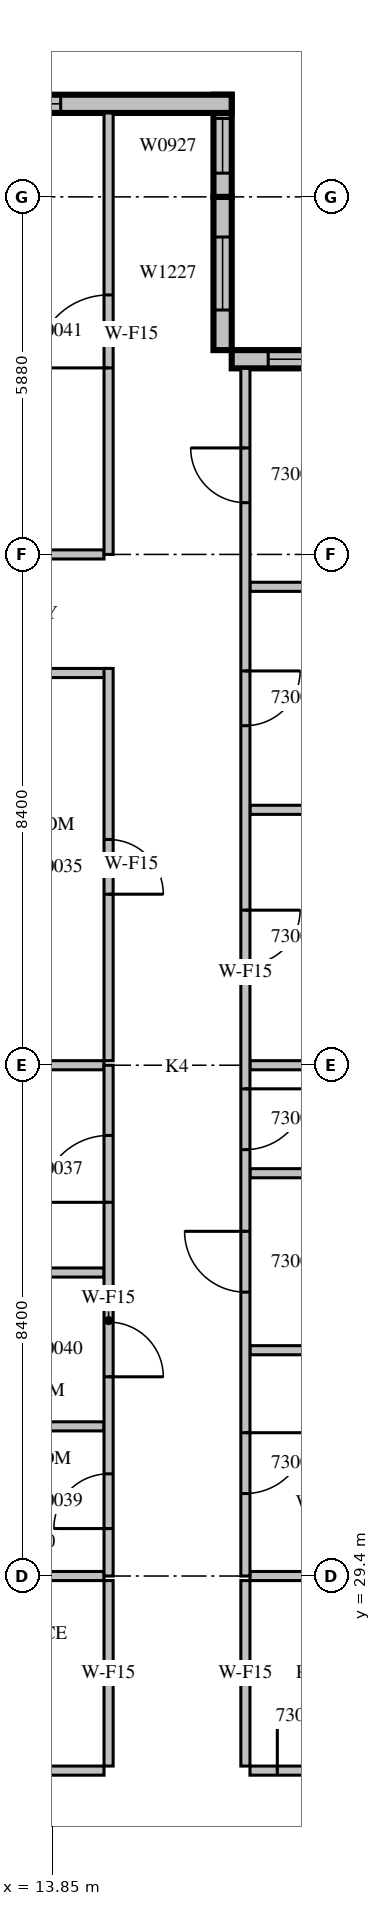
"""IFC4 building model, lengths in metres.
Left out: names, types, materials, properties, quantities, classifications, styles, units other than length and angle.
Written with IfcOpenShell. Run it as: python <this file> out.ifc"""

import sys

from ifc_helpers import new_model, si_unit, direction, frame, frame_2d, origin, place, context, subcontext, project, spatial, rectangle, extrude, source, transform, mapped, element, fill, save


model = new_model("IFC4")
c1 = context("Model", 3, precision=1e-05, world=origin(), true_north=direction((0.0, 1.0)))
c2 = subcontext(c1, "Body", "Model", "MODEL_VIEW")
j1 = project(units=[si_unit("LENGTHUNIT", "METRE"), si_unit("PLANEANGLEUNIT", "RADIAN")], contexts=[c1])
p1 = place(None, origin())
s1 = spatial("IfcSite", under=j1, at=p1, CompositionType="ELEMENT")
p2 = place(p1, origin())
s2 = spatial("IfcBuilding", under=s1, at=p2, CompositionType="ELEMENT")
p3 = place(p2, frame((0.0, 0.0, 137.1)))
s3 = spatial("IfcBuildingStorey", under=s2, at=p3, CompositionType="ELEMENT", Elevation=137.1)
m1 = source(origin(), c2, "Body", "SweptSolid", [
    extrude(rectangle(XDim=4.2, YDim=0.3, at=frame_2d((2.1, 0.0))), origin(), (0.0, 0.0, 1.0), 3.8),
])
p4 = place(p3, frame((21.0, 49.41, 0.0), z_axis=(0.0, 0.0, 1.0), x_axis=(-1.0, 0.0, 0.0)))
e1 = element("IfcWall", 1, at=p4, inside=s3, PredefinedType="STANDARD", context=c2, shape_type="MappedRepresentation", body=[
    mapped(m1, transform((0.0, 0.0, 0.0), scale=1.0)),
])
m2 = source(origin(), c2, "Body", "SweptSolid", [
    extrude(rectangle(XDim=3.0, YDim=2.7, at=frame_2d((1.5, 1.35))), frame((0.0, 0.16, 0.0), z_axis=(0.0, -1.0, 0.0), x_axis=(1.0, 0.0, 0.0)), (0.0, 0.0, 1.0), 0.32),
])
p5 = place(p4, frame((0.6, 0.0, 0.6)))
e2 = element("IfcOpeningElement", 2, at=p5, cuts=e1, PredefinedType="OPENING", context=c2, shape_type="MappedRepresentation", body=[
    mapped(m2, transform((0.0, 0.0, 0.0), scale=1.0)),
])
m3 = source(origin(), c2, "Body", "SweptSolid", [
    extrude(rectangle(XDim=2.52, YDim=0.3, at=frame_2d((1.26, 0.0))), origin(), (0.0, 0.0, 1.0), 3.8),
])
p6 = place(p3, frame((16.65, 49.56, 0.0), z_axis=(0.0, 0.0, 1.0), x_axis=(0.0, 1.0, 0.0)))
e3 = element("IfcWall", 3, at=p6, inside=s3, PredefinedType="STANDARD", context=c2, shape_type="MappedRepresentation", body=[
    mapped(m3, transform((0.0, 0.0, 0.0), scale=1.0)),
])
m4 = source(origin(), c2, "Body", "SweptSolid", [
    extrude(rectangle(XDim=1.2, YDim=2.7, at=frame_2d((0.6, 1.35))), frame((0.0, 0.16, 0.0), z_axis=(0.0, -1.0, 0.0), x_axis=(1.0, 0.0, 0.0)), (0.0, 0.0, 1.0), 0.32),
])
p7 = place(p6, frame((0.66, 0.0, 0.6)))
e4 = element("IfcOpeningElement", 4, at=p7, cuts=e3, PredefinedType="OPENING", context=c2, shape_type="MappedRepresentation", body=[
    mapped(m4, transform((0.0, 0.0, 0.0), scale=1.0)),
])
m5 = source(origin(), c2, "Body", "SweptSolid", [
    extrude(rectangle(XDim=1.68, YDim=0.3, at=frame_2d((0.84, 0.0))), origin(), (0.0, 0.0, 1.0), 3.8),
])
p8 = place(p3, frame((16.65, 52.08, 0.0), z_axis=(0.0, 0.0, 1.0), x_axis=(0.0, 1.0, 0.0)))
e5 = element("IfcWall", 5, at=p8, inside=s3, PredefinedType="STANDARD", context=c2, shape_type="MappedRepresentation", body=[
    mapped(m5, transform((0.0, 0.0, 0.0), scale=1.0)),
])
m6 = source(origin(), c2, "Body", "SweptSolid", [
    extrude(rectangle(XDim=0.9, YDim=2.7, at=frame_2d((0.45, 1.35))), frame((0.0, 0.16, 0.0), z_axis=(0.0, -1.0, 0.0), x_axis=(1.0, 0.0, 0.0)), (0.0, 0.0, 1.0), 0.32),
])
p9 = place(p8, frame((0.39, 0.0, 0.6)))
e6 = element("IfcOpeningElement", 6, at=p9, cuts=e5, PredefinedType="OPENING", context=c2, shape_type="MappedRepresentation", body=[
    mapped(m6, transform((0.0, 0.0, 0.0), scale=1.0)),
])
m7 = source(origin(), c2, "Body", "SweptSolid", [
    extrude(rectangle(XDim=10.5, YDim=0.3, at=frame_2d((5.25, 0.0))), origin(), (0.0, 0.0, 1.0), 3.8),
])
p10 = place(p3, frame((16.8, 53.61, 0.0), z_axis=(0.0, 0.0, 1.0), x_axis=(-1.0, 0.0, 0.0)))
e7 = element("IfcWall", 7, at=p10, inside=s3, PredefinedType="STANDARD", context=c2, shape_type="MappedRepresentation", body=[
    mapped(m7, transform((0.0, 0.0, 0.0), scale=1.0)),
])
m8 = source(origin(), c2, "Body", "SweptSolid", [
    extrude(rectangle(XDim=1.8, YDim=2.7, at=frame_2d((0.9, 1.35))), frame((0.0, 0.16, 0.0), z_axis=(0.0, -1.0, 0.0), x_axis=(1.0, 0.0, 0.0)), (0.0, 0.0, 1.0), 0.32),
])
p11 = place(p10, frame((8.025, 0.0, 0.6)))
e8 = element("IfcOpeningElement", 8, at=p11, cuts=e7, PredefinedType="OPENING", context=c2, shape_type="MappedRepresentation", body=[
    mapped(m8, transform((0.0, 0.0, 0.0), scale=1.0)),
])
m9 = source(origin(), c2, "Body", "SweptSolid", [
    extrude(rectangle(XDim=2.4, YDim=2.7, at=frame_2d((1.2, 1.35))), frame((0.0, 0.16, 0.0), z_axis=(0.0, -1.0, 0.0), x_axis=(1.0, 0.0, 0.0)), (0.0, 0.0, 1.0), 0.32),
])
p12 = place(p10, frame((2.812, 0.0, 0.6)))
e9 = element("IfcOpeningElement", 9, at=p12, cuts=e7, PredefinedType="OPENING", context=c2, shape_type="MappedRepresentation", body=[
    mapped(m9, transform((0.0, 0.0, 0.0), scale=1.0)),
])
m10 = source(origin(), c2, "Body", "SweptSolid", [
    extrude(rectangle(XDim=8.195, YDim=0.15, at=frame_2d((4.098, 0.0))), origin(), (0.0, 0.0, 1.0), 3.8),
])
p13 = place(p3, frame((6.505, 26.2, 0.0), z_axis=(0.0, 0.0, 1.0), x_axis=(1.0, 0.0, 0.0)))
e10 = element("IfcWall", 10, at=p13, inside=s3, PredefinedType="PARTITIONING", context=c2, shape_type="MappedRepresentation", body=[
    mapped(m10, transform((0.0, 0.0, 0.0), scale=1.0)),
])
m11 = source(origin(), c2, "Body", "SweptSolid", [
    extrude(rectangle(XDim=0.9, YDim=2.1, at=frame_2d((0.45, 1.05))), frame((0.0, 0.085, 0.0), z_axis=(0.0, -1.0, 0.0), x_axis=(1.0, 0.0, 0.0)), (0.0, 0.0, 1.0), 0.17),
])
p14 = place(p13, frame((0.695, 0.0, 0.0)))
e11 = element("IfcOpeningElement", 11, at=p14, cuts=e10, PredefinedType="OPENING", context=c2, shape_type="MappedRepresentation", body=[
    mapped(m11, transform((0.0, 0.0, 0.0), scale=1.0)),
])
p15 = place(p13, frame((5.62, 0.0, 0.0)))
e12 = element("IfcOpeningElement", 12, at=p15, cuts=e10, PredefinedType="OPENING", context=c2, shape_type="MappedRepresentation", body=[
    mapped(m11, transform((0.0, 0.0, 0.0), scale=1.0)),
])
m12 = source(origin(), c2, "Body", "SweptSolid", [
    extrude(rectangle(XDim=3.6, YDim=0.15, at=frame_2d((1.8, 0.0))), origin(), (0.0, 0.0, 1.0), 3.8),
])
p16 = place(p3, frame((17.1, 26.2, 0.0), z_axis=(0.0, 0.0, 1.0), x_axis=(1.0, 0.0, 0.0)))
e13 = element("IfcWall", 13, at=p16, inside=s3, PredefinedType="PARTITIONING", context=c2, shape_type="MappedRepresentation", body=[
    mapped(m12, transform((0.0, 0.0, 0.0), scale=1.0)),
])
p17 = place(p16, frame((0.45, 0.0, 0.0)))
e14 = element("IfcOpeningElement", 14, at=p17, cuts=e13, PredefinedType="OPENING", context=c2, shape_type="MappedRepresentation", body=[
    mapped(m11, transform((0.0, 0.0, 0.0), scale=1.0)),
])
m13 = source(origin(), c2, "Body", "SweptSolid", [
    extrude(rectangle(XDim=3.05, YDim=0.15, at=frame_2d((1.525, 0.0))), origin(), (0.0, 0.0, 1.0), 3.8),
])
for number, where, z_axis, x_axis in (
    (15, (14.775, 26.275, 0.0), (0.0, 0.0, 1.0), (0.0, 1.0, 0.0)),
    (16, (17.025, 29.325, 0.0), (0.0, 0.0, 1.0), (0.0, -1.0, 0.0)),
):
    element("IfcWall", number, at=place(p3, frame(where, z_axis=z_axis, x_axis=x_axis)), inside=s3, PredefinedType="PARTITIONING", context=c2, shape_type="MappedRepresentation", body=[
        mapped(m13, transform((0.0, 0.0, 0.0), scale=1.0)),
    ])
m14 = source(origin(), c2, "Body", "SweptSolid", [
    extrude(rectangle(XDim=3.676, YDim=0.15, at=frame_2d((1.838, 0.0))), origin(), (0.0, 0.0, 1.0), 3.8),
])
p18 = place(p3, frame((14.7, 29.4, 0.0), z_axis=(0.0, 0.0, 1.0), x_axis=(-1.0, 0.0, 0.0)))
e17 = element("IfcWall", 17, at=p18, inside=s3, PredefinedType="PARTITIONING", context=c2, shape_type="MappedRepresentation", body=[
    mapped(m14, transform((0.0, 0.0, 0.0), scale=1.0)),
])
m15 = source(origin(), c2, "Body", "SweptSolid", [
    extrude(rectangle(XDim=2.851, YDim=0.15, at=frame_2d((1.425, 0.0))), origin(), (0.0, 0.0, 1.0), 3.8),
])
p19 = place(p3, frame((19.951, 29.4, 0.0), z_axis=(0.0, 0.0, 1.0), x_axis=(-1.0, 0.0, 0.0)))
e18 = element("IfcWall", 18, at=p19, inside=s3, PredefinedType="PARTITIONING", context=c2, shape_type="MappedRepresentation", body=[
    mapped(m15, transform((0.0, 0.0, 0.0), scale=1.0)),
])
m16 = source(origin(), c2, "Body", "SweptSolid", [
    extrude(rectangle(XDim=3.675, YDim=0.15, at=frame_2d((1.837, 0.0))), origin(), (0.0, 0.0, 1.0), 3.8),
])
p20 = place(p3, frame((14.775, 44.25, 0.0), z_axis=(0.0, 0.0, 1.0), x_axis=(-1.0, 0.0, 0.0)))
e19 = element("IfcWall", 19, at=p20, inside=s3, PredefinedType="PARTITIONING", context=c2, shape_type="MappedRepresentation", body=[
    mapped(m16, transform((0.0, 0.0, 0.0), scale=1.0)),
])
m17 = source(origin(), c2, "Body", "SweptSolid", [
    extrude(rectangle(XDim=6.45, YDim=0.15, at=frame_2d((3.225, 0.0))), origin(), (0.0, 0.0, 1.0), 3.8),
])
p21 = place(p3, frame((14.775, 37.875, 0.0), z_axis=(0.0, 0.0, 1.0), x_axis=(0.0, 1.0, 0.0)))
e20 = element("IfcWall", 20, at=p21, inside=s3, PredefinedType="PARTITIONING", context=c2, shape_type="MappedRepresentation", body=[
    mapped(m17, transform((0.0, 0.0, 0.0), scale=1.0)),
])
p22 = place(p21, frame((2.737, 0.0, 0.0)))
e21 = element("IfcOpeningElement", 21, at=p22, cuts=e20, PredefinedType="OPENING", context=c2, shape_type="MappedRepresentation", body=[
    mapped(m11, transform((0.0, 0.0, 0.0), scale=1.0)),
])
m18 = source(origin(), c2, "Body", "SweptSolid", [
    extrude(rectangle(XDim=3.525, YDim=0.15, at=frame_2d((1.762, 0.0))), origin(), (0.0, 0.0, 1.0), 3.8),
])
for number, where, z_axis, x_axis in (
    (22, (14.7, 31.861, 0.0), (0.0, 0.0, 1.0), (-1.0, 0.0, 0.0)),
    (23, (14.7, 34.391, 0.0), (0.0, 0.0, 1.0), (-1.0, 0.0, 0.0)),
    (24, (14.7, 37.8, 0.0), (0.0, 0.0, 1.0), (-1.0, 0.0, 0.0)),
    (25, (14.7, 46.2, 0.0), (0.0, 0.0, 1.0), (-1.0, 0.0, 0.0)),
):
    element("IfcWall", number, at=place(p3, frame(where, z_axis=z_axis, x_axis=x_axis)), inside=s3, PredefinedType="PARTITIONING", context=c2, shape_type="MappedRepresentation", body=[
        mapped(m18, transform((0.0, 0.0, 0.0), scale=1.0)),
    ])
for number, where, z_axis, x_axis in (
    (26, (17.1, 33.113, 0.0), (0.0, 0.0, 1.0), (1.0, 0.0, 0.0)),
    (27, (17.1, 36.024, 0.0), (0.0, 0.0, 1.0), (1.0, 0.0, 0.0)),
    (28, (17.1, 45.667, 0.0), (0.0, 0.0, 1.0), (1.0, 0.0, 0.0)),
):
    element("IfcWall", number, at=place(p3, frame(where, z_axis=z_axis, x_axis=x_axis)), inside=s3, PredefinedType="PARTITIONING", context=c2, shape_type="MappedRepresentation", body=[
        mapped(m12, transform((0.0, 0.0, 0.0), scale=1.0)),
    ])
p23 = place(p3, frame((19.951, 37.8, 0.0), z_axis=(0.0, 0.0, 1.0), x_axis=(-1.0, 0.0, 0.0)))
e29 = element("IfcWall", 29, at=p23, inside=s3, PredefinedType="PARTITIONING", context=c2, shape_type="MappedRepresentation", body=[
    mapped(m15, transform((0.0, 0.0, 0.0), scale=1.0)),
])
p24 = place(p3, frame((20.7, 42.0, 0.0), z_axis=(0.0, 0.0, 1.0), x_axis=(-1.0, 0.0, 0.0)))
e30 = element("IfcWall", 30, at=p24, inside=s3, PredefinedType="PARTITIONING", context=c2, shape_type="MappedRepresentation", body=[
    mapped(m12, transform((0.0, 0.0, 0.0), scale=1.0)),
])
m19 = source(origin(), c2, "Body", "SweptSolid", [
    extrude(rectangle(XDim=8.4, YDim=0.15, at=frame_2d((4.2, 0.0))), origin(), (0.0, 0.0, 1.0), 3.8),
])
p25 = place(p3, frame((14.775, 29.4, 0.0), z_axis=(0.0, 0.0, 1.0), x_axis=(0.0, 1.0, 0.0)))
e31 = element("IfcWall", 31, at=p25, inside=s3, PredefinedType="PARTITIONING", context=c2, shape_type="MappedRepresentation", body=[
    mapped(m19, transform((0.0, 0.0, 0.0), scale=1.0)),
])
m20 = source(origin(), c2, "Body", "SweptSolid", [
    extrude(rectangle(XDim=1.1, YDim=2.1, at=frame_2d((0.55, 1.05))), frame((0.0, 0.085, 0.0), z_axis=(0.0, -1.0, 0.0), x_axis=(1.0, 0.0, 0.0)), (0.0, 0.0, 1.0), 0.17),
])
p26 = place(p25, frame((6.146, 0.0, 0.0)))
e32 = element("IfcOpeningElement", 32, at=p26, cuts=e31, PredefinedType="OPENING", context=c2, shape_type="MappedRepresentation", body=[
    mapped(m20, transform((0.0, 0.0, 0.0), scale=1.0)),
])
p27 = place(p25, frame((0.781, 0.0, 0.0)))
e33 = element("IfcOpeningElement", 33, at=p27, cuts=e31, PredefinedType="OPENING", context=c2, shape_type="MappedRepresentation", body=[
    mapped(m11, transform((0.0, 0.0, 0.0), scale=1.0)),
])
p28 = place(p25, frame((3.276, 0.0, 0.0)))
e34 = element("IfcOpeningElement", 34, at=p28, cuts=e31, PredefinedType="OPENING", context=c2, shape_type="MappedRepresentation", body=[
    mapped(m11, transform((0.0, 0.0, 0.0), scale=1.0)),
])
m21 = source(origin(), c2, "Body", "SweptSolid", [
    extrude(rectangle(XDim=7.26, YDim=0.15, at=frame_2d((3.63, 0.0))), origin(), (0.0, 0.0, 1.0), 3.8),
])
p29 = place(p3, frame((14.775, 46.2, 0.0), z_axis=(0.0, 0.0, 1.0), x_axis=(0.0, 1.0, 0.0)))
e35 = element("IfcWall", 35, at=p29, inside=s3, PredefinedType="PARTITIONING", context=c2, shape_type="MappedRepresentation", body=[
    mapped(m21, transform((0.0, 0.0, 0.0), scale=1.0)),
])
m22 = source(origin(), c2, "Body", "SweptSolid", [
    extrude(rectangle(XDim=1.2, YDim=2.1, at=frame_2d((0.6, 1.05))), frame((0.0, 0.085, 0.0), z_axis=(0.0, -1.0, 0.0), x_axis=(1.0, 0.0, 0.0)), (0.0, 0.0, 1.0), 0.17),
])
p30 = place(p29, frame((3.067, 0.0, 0.0)))
e36 = element("IfcOpeningElement", 36, at=p30, cuts=e35, PredefinedType="OPENING", context=c2, shape_type="MappedRepresentation", body=[
    mapped(m22, transform((0.0, 0.0, 0.0), scale=1.0)),
])
m23 = source(origin(), c2, "Body", "SweptSolid", [
    extrude(rectangle(XDim=19.86, YDim=0.15, at=frame_2d((9.93, 0.0))), origin(), (0.0, 0.0, 1.0), 3.8),
])
p31 = place(p3, frame((17.025, 49.26, 0.0), z_axis=(0.0, 0.0, 1.0), x_axis=(0.0, -1.0, 0.0)))
e37 = element("IfcWall", 37, at=p31, inside=s3, PredefinedType="PARTITIONING", context=c2, shape_type="MappedRepresentation", body=[
    mapped(m23, transform((0.0, 0.0, 0.0), scale=1.0)),
])
m24 = source(origin(), c2, "Body", "SweptSolid", [
    extrude(rectangle(XDim=1.0, YDim=2.1, at=frame_2d((0.5, 1.05))), frame((0.0, 0.085, 0.0), z_axis=(0.0, -1.0, 0.0), x_axis=(1.0, 0.0, 0.0)), (0.0, 0.0, 1.0), 0.17),
])
p32 = place(p31, frame((17.503, 0.0, 0.0)))
e38 = element("IfcOpeningElement", 38, at=p32, cuts=e37, PredefinedType="OPENING", context=c2, shape_type="MappedRepresentation", body=[
    mapped(m24, transform((0.0, 0.0, 0.0), scale=1.0)),
])
p33 = place(p31, frame((14.191, 0.0, 0.0)))
e39 = element("IfcOpeningElement", 39, at=p33, cuts=e37, PredefinedType="OPENING", context=c2, shape_type="MappedRepresentation", body=[
    mapped(m24, transform((0.0, 0.0, 0.0), scale=1.0)),
])
p34 = place(p31, frame((11.848, 0.0, 0.0)))
e40 = element("IfcOpeningElement", 40, at=p34, cuts=e37, PredefinedType="OPENING", context=c2, shape_type="MappedRepresentation", body=[
    mapped(m24, transform((0.0, 0.0, 0.0), scale=1.0)),
])
p35 = place(p31, frame((8.91, 0.0, 0.0)))
e41 = element("IfcOpeningElement", 41, at=p35, cuts=e37, PredefinedType="OPENING", context=c2, shape_type="MappedRepresentation", body=[
    mapped(m11, transform((0.0, 0.0, 0.0), scale=1.0)),
])
p36 = place(p31, frame((4.976, 0.0, 0.0)))
e42 = element("IfcOpeningElement", 42, at=p36, cuts=e37, PredefinedType="OPENING", context=c2, shape_type="MappedRepresentation", body=[
    mapped(m11, transform((0.0, 0.0, 0.0), scale=1.0)),
])
p37 = place(p31, frame((1.309, 0.0, 0.0)))
e43 = element("IfcOpeningElement", 43, at=p37, cuts=e37, PredefinedType="OPENING", context=c2, shape_type="MappedRepresentation", body=[
    mapped(m11, transform((0.0, 0.0, 0.0), scale=1.0)),
])
m25 = source(origin(), c2, "Body", "SweptSolid", [
    extrude(rectangle(XDim=3.0, YDim=2.7, at=frame_2d((1.5, 1.35))), frame((0.0, 0.03, 0.0), z_axis=(0.0, -1.0, 0.0), x_axis=(1.0, 0.0, 0.0)), (0.0, 0.0, 1.0), 0.06),
])
p38 = place(p5, origin())
e44 = element("IfcWindow", 44, at=p38, inside=s3, PartitioningType="SINGLE_PANEL", PredefinedType="WINDOW", context=c2, shape_type="MappedRepresentation", body=[
    mapped(m25, transform((0.0, 0.0, 0.0), scale=1.0)),
])
fill(e2, e44)
m26 = source(origin(), c2, "Body", "SweptSolid", [
    extrude(rectangle(XDim=1.2, YDim=2.7, at=frame_2d((0.6, 1.35))), frame((0.0, 0.03, 0.0), z_axis=(0.0, -1.0, 0.0), x_axis=(1.0, 0.0, 0.0)), (0.0, 0.0, 1.0), 0.06),
])
p39 = place(p7, origin())
e45 = element("IfcWindow", 45, at=p39, inside=s3, PartitioningType="SINGLE_PANEL", PredefinedType="WINDOW", context=c2, shape_type="MappedRepresentation", body=[
    mapped(m26, transform((0.0, 0.0, 0.0), scale=1.0)),
])
fill(e4, e45)
m27 = source(origin(), c2, "Body", "SweptSolid", [
    extrude(rectangle(XDim=0.9, YDim=2.7, at=frame_2d((0.45, 1.35))), frame((0.0, 0.03, 0.0), z_axis=(0.0, -1.0, 0.0), x_axis=(1.0, 0.0, 0.0)), (0.0, 0.0, 1.0), 0.06),
])
p40 = place(p9, origin())
e46 = element("IfcWindow", 46, at=p40, inside=s3, PartitioningType="SINGLE_PANEL", PredefinedType="WINDOW", context=c2, shape_type="MappedRepresentation", body=[
    mapped(m27, transform((0.0, 0.0, 0.0), scale=1.0)),
])
fill(e6, e46)
m28 = source(origin(), c2, "Body", "SweptSolid", [
    extrude(rectangle(XDim=2.4, YDim=2.7, at=frame_2d((1.2, 1.35))), frame((0.0, 0.03, 0.0), z_axis=(0.0, -1.0, 0.0), x_axis=(1.0, 0.0, 0.0)), (0.0, 0.0, 1.0), 0.06),
])
p41 = place(p12, origin())
e47 = element("IfcWindow", 47, at=p41, inside=s3, PartitioningType="SINGLE_PANEL", PredefinedType="WINDOW", context=c2, shape_type="MappedRepresentation", body=[
    mapped(m28, transform((0.0, 0.0, 0.0), scale=1.0)),
])
fill(e9, e47)
m29 = source(origin(), c2, "Body", "SweptSolid", [
    extrude(rectangle(XDim=0.9, YDim=2.1, at=frame_2d((0.45, 1.05))), frame((0.0, 0.025, 0.0), z_axis=(0.0, -1.0, 0.0), x_axis=(1.0, 0.0, 0.0)), (0.0, 0.0, 1.0), 0.05),
])
p42 = place(p17, origin())
e48 = element("IfcDoor", 48, at=p42, inside=s3, OperationType="SINGLE_SWING_LEFT", PredefinedType="DOOR", context=c2, shape_type="MappedRepresentation", body=[
    mapped(m29, transform((0.0, 0.0, 0.0), scale=1.0)),
])
fill(e14, e48)
p43 = place(p22, origin())
e49 = element("IfcDoor", 49, at=p43, inside=s3, OperationType="SINGLE_SWING_RIGHT", PredefinedType="DOOR", context=c2, shape_type="MappedRepresentation", body=[
    mapped(m29, transform((0.0, 0.0, 0.0), scale=1.0)),
])
fill(e21, e49)
m30 = source(origin(), c2, "Body", "SweptSolid", [
    extrude(rectangle(XDim=1.1, YDim=2.1, at=frame_2d((0.55, 1.05))), frame((0.0, 0.025, 0.0), z_axis=(0.0, -1.0, 0.0), x_axis=(1.0, 0.0, 0.0)), (0.0, 0.0, 1.0), 0.05),
])
p44 = place(p26, origin())
e50 = element("IfcDoor", 50, at=p44, inside=s3, OperationType="SINGLE_SWING_LEFT", PredefinedType="DOOR", context=c2, shape_type="MappedRepresentation", body=[
    mapped(m30, transform((0.0, 0.0, 0.0), scale=1.0)),
])
fill(e32, e50)
p45 = place(p27, origin())
e51 = element("IfcDoor", 51, at=p45, inside=s3, OperationType="SINGLE_SWING_LEFT", PredefinedType="DOOR", context=c2, shape_type="MappedRepresentation", body=[
    mapped(m29, transform((0.0, 0.0, 0.0), scale=1.0)),
])
fill(e33, e51)
p46 = place(p28, origin())
e52 = element("IfcDoor", 52, at=p46, inside=s3, OperationType="SINGLE_SWING_RIGHT", PredefinedType="DOOR", context=c2, shape_type="MappedRepresentation", body=[
    mapped(m29, transform((0.0, 0.0, 0.0), scale=1.0)),
])
fill(e34, e52)
m31 = source(origin(), c2, "Body", "SweptSolid", [
    extrude(rectangle(XDim=1.2, YDim=2.1, at=frame_2d((0.6, 1.05))), frame((0.0, 0.025, 0.0), z_axis=(0.0, -1.0, 0.0), x_axis=(1.0, 0.0, 0.0)), (0.0, 0.0, 1.0), 0.05),
])
p47 = place(p30, origin())
e53 = element("IfcDoor", 53, at=p47, inside=s3, OperationType="SINGLE_SWING_LEFT", PredefinedType="DOOR", context=c2, shape_type="MappedRepresentation", body=[
    mapped(m31, transform((0.0, 0.0, 0.0), scale=1.0)),
])
fill(e36, e53)
m32 = source(origin(), c2, "Body", "SweptSolid", [
    extrude(rectangle(XDim=1.0, YDim=2.1, at=frame_2d((0.5, 1.05))), frame((0.0, 0.025, 0.0), z_axis=(0.0, -1.0, 0.0), x_axis=(1.0, 0.0, 0.0)), (0.0, 0.0, 1.0), 0.05),
])
p48 = place(p32, origin())
e54 = element("IfcDoor", 54, at=p48, inside=s3, OperationType="SINGLE_SWING_LEFT", PredefinedType="DOOR", context=c2, shape_type="MappedRepresentation", body=[
    mapped(m32, transform((0.0, 0.0, 0.0), scale=1.0)),
])
fill(e38, e54)
p49 = place(p33, origin())
e55 = element("IfcDoor", 55, at=p49, inside=s3, OperationType="SINGLE_SWING_RIGHT", PredefinedType="DOOR", context=c2, shape_type="MappedRepresentation", body=[
    mapped(m32, transform((0.0, 0.0, 0.0), scale=1.0)),
])
fill(e39, e55)
p50 = place(p34, origin())
e56 = element("IfcDoor", 56, at=p50, inside=s3, OperationType="SINGLE_SWING_LEFT", PredefinedType="DOOR", context=c2, shape_type="MappedRepresentation", body=[
    mapped(m32, transform((0.0, 0.0, 0.0), scale=1.0)),
])
fill(e40, e56)
p51 = place(p35, origin())
e57 = element("IfcDoor", 57, at=p51, inside=s3, OperationType="SINGLE_SWING_LEFT", PredefinedType="DOOR", context=c2, shape_type="MappedRepresentation", body=[
    mapped(m29, transform((0.0, 0.0, 0.0), scale=1.0)),
])
fill(e41, e57)
p52 = place(p36, origin())
e58 = element("IfcDoor", 58, at=p52, inside=s3, OperationType="SINGLE_SWING_LEFT", PredefinedType="DOOR", context=c2, shape_type="MappedRepresentation", body=[
    mapped(m29, transform((0.0, 0.0, 0.0), scale=1.0)),
])
fill(e42, e58)
p53 = place(p37, origin())
e59 = element("IfcDoor", 59, at=p53, inside=s3, OperationType="SINGLE_SWING_RIGHT", PredefinedType="DOOR", context=c2, shape_type="MappedRepresentation", body=[
    mapped(m29, transform((0.0, 0.0, 0.0), scale=1.0)),
])
fill(e43, e59)
save(model, sys.argv[1])
